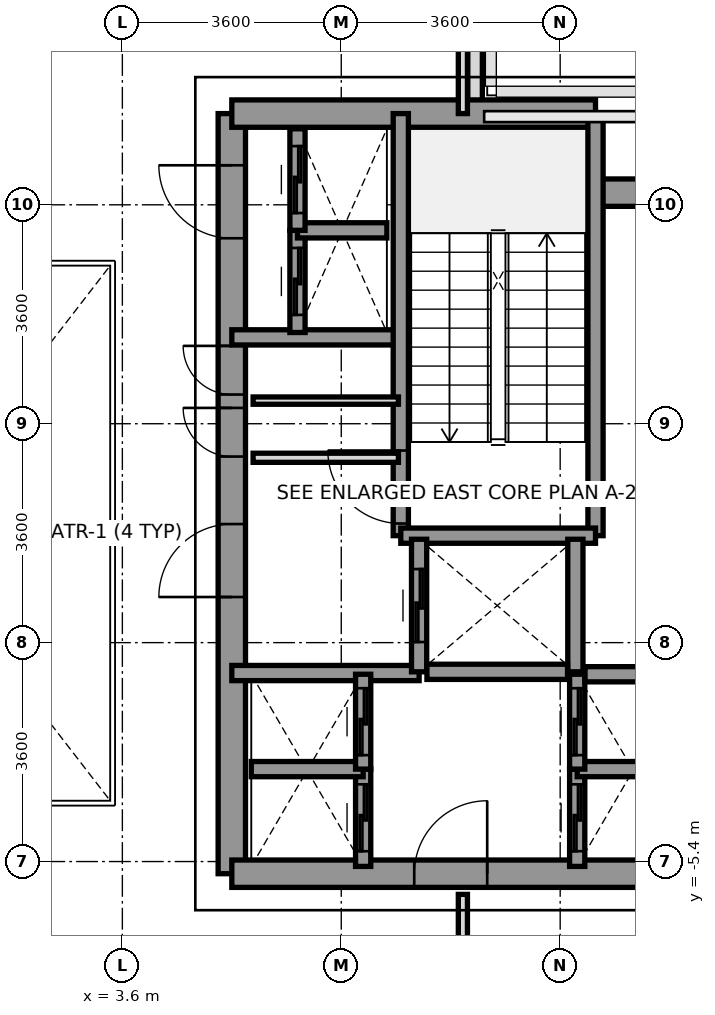
"""IFC4 building model, lengths in metres.
Left out: names, types, materials, properties, quantities, classifications, styles, units other than length and angle.
Written with IfcOpenShell. Run it as: python <this file> out.ifc"""

import sys

from ifc_helpers import new_model, si_unit, direction, frame, frame_2d, origin, place, context, subcontext, project, spatial, rectangle, extrude, source, transform, mapped, element, fill, save


model = new_model("IFC4")
c1 = context("Model", 3, precision=1e-05, world=origin(), true_north=direction((0.0, 1.0)))
c2 = subcontext(c1, "Body", "Model", "MODEL_VIEW")
j1 = project(units=[si_unit("LENGTHUNIT", "METRE"), si_unit("PLANEANGLEUNIT", "RADIAN")], contexts=[c1])
p1 = place(None, origin())
s1 = spatial("IfcSite", under=j1, at=p1, CompositionType="ELEMENT")
p2 = place(p1, origin())
s2 = spatial("IfcBuilding", under=s1, at=p2, CompositionType="ELEMENT")
p3 = place(p2, frame((0.0, 0.0, 93.0)))
s3 = spatial("IfcBuildingStorey", under=s2, at=p3, CompositionType="ELEMENT", Elevation=93.0)
p4 = place(p3, frame((9.4, 8.472, 0.0), z_axis=(0.0, 0.0, 1.0), x_axis=(0.0, -1.0, 0.0)))
e1 = element("IfcWall", 1, at=p4, inside=s3, PredefinedType="PARAPET", context=c2, shape_type="SweptSolid", body=[
    extrude(rectangle(XDim=1.519, YDim=0.24, at=frame_2d((0.76, 0.0))), origin(), (0.0, 0.0, 1.0), 1.15),
])
p5 = place(p3, frame((5.4, -5.6, 0.0), z_axis=(0.0, 0.0, 1.0), x_axis=(0.0, 1.0, 0.0)))
e2 = element("IfcWall", 2, at=p5, inside=s3, PredefinedType="SHEAR", context=c2, shape_type="SweptSolid", body=[
    extrude(rectangle(XDim=12.5, YDim=0.45, at=frame_2d((6.25, 0.0))), origin(), (0.0, 0.0, 1.0), 4.0),
])
p6 = place(p5, frame((4.55, 0.0, 0.0)))
e3 = element("IfcOpeningElement", 3, at=p6, cuts=e2, PredefinedType="OPENING", context=c2, shape_type="SweptSolid", body=[
    extrude(rectangle(XDim=1.2, YDim=2.2, at=frame_2d((0.6, 1.1))), frame((0.0, 0.235, 0.0), z_axis=(0.0, -1.0, 0.0), x_axis=(1.0, 0.0, 0.0)), (0.0, 0.0, 1.0), 0.47),
])
p7 = place(p5, frame((10.45, 0.0, 0.0)))
e4 = element("IfcOpeningElement", 4, at=p7, cuts=e2, PredefinedType="OPENING", context=c2, shape_type="SweptSolid", body=[
    extrude(rectangle(XDim=1.2, YDim=2.2, at=frame_2d((0.6, 1.1))), frame((0.0, 0.235, 0.0), z_axis=(0.0, -1.0, 0.0), x_axis=(1.0, 0.0, 0.0)), (0.0, 0.0, 1.0), 0.47),
])
p8 = place(p5, frame((6.86, 0.0, 0.0)))
e5 = element("IfcOpeningElement", 5, at=p8, cuts=e2, PredefinedType="OPENING", context=c2, shape_type="SweptSolid", body=[
    extrude(rectangle(XDim=0.8, YDim=2.1, at=frame_2d((0.4, 1.05))), frame((0.0, 0.235, 0.0), z_axis=(0.0, -1.0, 0.0), x_axis=(1.0, 0.0, 0.0)), (0.0, 0.0, 1.0), 0.47),
])
p9 = place(p5, frame((7.88, 0.0, 0.0)))
e6 = element("IfcOpeningElement", 6, at=p9, cuts=e2, PredefinedType="OPENING", context=c2, shape_type="SweptSolid", body=[
    extrude(rectangle(XDim=0.8, YDim=2.1, at=frame_2d((0.4, 1.05))), frame((0.0, 0.235, 0.0), z_axis=(0.0, -1.0, 0.0), x_axis=(1.0, 0.0, 0.0)), (0.0, 0.0, 1.0), 0.47),
])
p10 = place(p3, frame((5.4, 6.9, 0.0), z_axis=(0.0, 0.0, 1.0), x_axis=(1.0, 0.0, 0.0)))
e7 = element("IfcWall", 7, at=p10, inside=s3, PredefinedType="SHEAR", context=c2, shape_type="SweptSolid", body=[
    extrude(rectangle(XDim=5.981, YDim=0.45, at=frame_2d((2.991, 0.0))), origin(), (0.0, 0.0, 1.0), 4.0),
])
p11 = place(p3, frame((11.381, 5.6, 0.0), z_axis=(0.0, 0.0, 1.0), x_axis=(1.0, 0.0, 0.0)))
e8 = element("IfcWall", 8, at=p11, inside=s3, PredefinedType="SHEAR", context=c2, shape_type="SweptSolid", body=[
    extrude(rectangle(XDim=1.819, YDim=0.45, at=frame_2d((0.909, 0.0))), origin(), (0.0, 0.0, 1.0), 4.0),
])
p12 = place(p3, frame((5.4, -5.6, 0.0), z_axis=(0.0, 0.0, 1.0), x_axis=(1.0, 0.0, 0.0)))
e9 = element("IfcWall", 9, at=p12, inside=s3, PredefinedType="SHEAR", context=c2, shape_type="SweptSolid", body=[
    extrude(rectangle(XDim=7.8, YDim=0.45, at=frame_2d((3.9, 0.0))), origin(), (0.0, 0.0, 1.0), 4.0),
])
p13 = place(p12, frame((3.0, 0.0, 0.0)))
e10 = element("IfcOpeningElement", 10, at=p13, cuts=e9, PredefinedType="OPENING", context=c2, shape_type="SweptSolid", body=[
    extrude(rectangle(XDim=1.2, YDim=2.2, at=frame_2d((0.6, 1.1))), frame((0.0, 0.235, 0.0), z_axis=(0.0, -1.0, 0.0), x_axis=(1.0, 0.0, 0.0)), (0.0, 0.0, 1.0), 0.47),
])
p14 = place(p3, frame((5.4, 3.22, 0.0), z_axis=(0.0, 0.0, 1.0), x_axis=(1.0, 0.0, 0.0)))
e11 = element("IfcWall", 11, at=p14, inside=s3, PredefinedType="SOLIDWALL", context=c2, shape_type="SweptSolid", body=[
    extrude(rectangle(XDim=2.78, YDim=0.25, at=frame_2d((1.39, 0.0))), origin(), (0.0, 0.0, 1.0), 4.0),
])
p15 = place(p3, frame((5.4, -2.3, 0.0), z_axis=(0.0, 0.0, 1.0), x_axis=(1.0, 0.0, 0.0)))
e12 = element("IfcWall", 12, at=p15, inside=s3, PredefinedType="SOLIDWALL", context=c2, shape_type="SweptSolid", body=[
    extrude(rectangle(XDim=3.08, YDim=0.25, at=frame_2d((1.54, 0.0))), origin(), (0.0, 0.0, 1.0), 4.0),
])
p16 = place(p3, frame((8.179, -0.041, 0.0), z_axis=(0.0, 0.0, 1.0), x_axis=(0.0, 1.0, 0.0)))
e13 = element("IfcWall", 13, at=p16, inside=s3, PredefinedType="SOLIDWALL", context=c2, shape_type="SweptSolid", body=[
    extrude(rectangle(XDim=6.941, YDim=0.25, at=frame_2d((3.47, 0.0))), origin(), (0.0, 0.0, 1.0), 4.0),
])
p17 = place(p16, frame((0.2, 0.0, 0.0)))
e14 = element("IfcOpeningElement", 14, at=p17, cuts=e13, PredefinedType="OPENING", context=c2, shape_type="SweptSolid", body=[
    extrude(rectangle(XDim=1.2, YDim=2.2, at=frame_2d((0.6, 1.1))), frame((0.0, 0.135, 0.0), z_axis=(0.0, -1.0, 0.0), x_axis=(1.0, 0.0, 0.0)), (0.0, 0.0, 1.0), 0.27),
])
p18 = place(p3, frame((11.381, -0.041, 0.0), z_axis=(0.0, 0.0, 1.0), x_axis=(0.0, 1.0, 0.0)))
e15 = element("IfcWall", 15, at=p18, inside=s3, PredefinedType="SOLIDWALL", context=c2, shape_type="SweptSolid", body=[
    extrude(rectangle(XDim=6.941, YDim=0.25, at=frame_2d((3.47, 0.0))), origin(), (0.0, 0.0, 1.0), 4.0),
])
p19 = place(p3, frame((8.179, -0.041, 0.0), z_axis=(0.0, 0.0, 1.0), x_axis=(1.0, 0.0, 0.0)))
e16 = element("IfcWall", 16, at=p19, inside=s3, PredefinedType="SOLIDWALL", context=c2, shape_type="SweptSolid", body=[
    extrude(rectangle(XDim=3.202, YDim=0.25, at=frame_2d((1.601, 0.0))), origin(), (0.0, 0.0, 1.0), 4.0),
])
p20 = place(p3, frame((8.48, -2.28, 0.0), z_axis=(0.0, 0.0, 1.0), x_axis=(0.0, 1.0, 0.0)))
e17 = element("IfcWall", 17, at=p20, inside=s3, PredefinedType="SOLIDWALL", context=c2, shape_type="SweptSolid", body=[
    extrude(rectangle(XDim=2.18, YDim=0.25, at=frame_2d((1.09, 0.0))), origin(), (0.0, 0.0, 1.0), 4.0),
])
p21 = place(p20, frame((0.49, 0.0, 0.0)))
e18 = element("IfcOpeningElement", 18, at=p21, cuts=e17, PredefinedType="OPENING", context=c2, shape_type="SweptSolid", body=[
    extrude(rectangle(XDim=1.2, YDim=2.2, at=frame_2d((0.6, 1.1))), frame((0.0, 0.135, 0.0), z_axis=(0.0, -1.0, 0.0), x_axis=(1.0, 0.0, 0.0)), (0.0, 0.0, 1.0), 0.27),
])
p22 = place(p3, frame((11.05, -2.28, 0.0), z_axis=(0.0, 0.0, 1.0), x_axis=(0.0, 1.0, 0.0)))
e19 = element("IfcWall", 19, at=p22, inside=s3, PredefinedType="SOLIDWALL", context=c2, shape_type="SweptSolid", body=[
    extrude(rectangle(XDim=2.18, YDim=0.25, at=frame_2d((1.09, 0.0))), origin(), (0.0, 0.0, 1.0), 4.0),
])
p23 = place(p3, frame((8.609, -2.28, 0.0), z_axis=(0.0, 0.0, 1.0), x_axis=(1.0, 0.0, 0.0)))
e20 = element("IfcWall", 20, at=p23, inside=s3, PredefinedType="SOLIDWALL", context=c2, shape_type="SweptSolid", body=[
    extrude(rectangle(XDim=2.312, YDim=0.25, at=frame_2d((1.156, 0.0))), origin(), (0.0, 0.0, 1.0), 4.0),
])
p24 = place(p3, frame((11.08, -5.48, 0.0), z_axis=(0.0, 0.0, 1.0), x_axis=(0.0, 1.0, 0.0)))
e21 = element("IfcWall", 21, at=p24, inside=s3, PredefinedType="SOLIDWALL", context=c2, shape_type="SweptSolid", body=[
    extrude(rectangle(XDim=1.6, YDim=0.25, at=frame_2d((0.8, 0.0))), origin(), (0.0, 0.0, 1.0), 4.0),
])
p25 = place(p24, frame((0.25, 0.0, 0.0)))
e22 = element("IfcOpeningElement", 22, at=p25, cuts=e21, PredefinedType="OPENING", context=c2, shape_type="SweptSolid", body=[
    extrude(rectangle(XDim=1.1, YDim=2.2, at=frame_2d((0.55, 1.1))), frame((0.0, 0.135, 0.0), z_axis=(0.0, -1.0, 0.0), x_axis=(1.0, 0.0, 0.0)), (0.0, 0.0, 1.0), 0.27),
])
p26 = place(p3, frame((11.08, -3.88, 0.0), z_axis=(0.0, 0.0, 1.0), x_axis=(1.0, 0.0, 0.0)))
e23 = element("IfcWall", 23, at=p26, inside=s3, PredefinedType="SOLIDWALL", context=c2, shape_type="SweptSolid", body=[
    extrude(rectangle(XDim=1.84, YDim=0.25, at=frame_2d((0.92, 0.0))), origin(), (0.0, 0.0, 1.0), 4.0),
])
p27 = place(p3, frame((11.08, -3.88, 0.0), z_axis=(0.0, 0.0, 1.0), x_axis=(0.0, 1.0, 0.0)))
e24 = element("IfcWall", 24, at=p27, inside=s3, PredefinedType="SOLIDWALL", context=c2, shape_type="SweptSolid", body=[
    extrude(rectangle(XDim=1.56, YDim=0.25, at=frame_2d((0.78, 0.0))), origin(), (0.0, 0.0, 1.0), 4.0),
])
p28 = place(p27, frame((0.23, 0.0, 0.0)))
e25 = element("IfcOpeningElement", 25, at=p28, cuts=e24, PredefinedType="OPENING", context=c2, shape_type="SweptSolid", body=[
    extrude(rectangle(XDim=1.1, YDim=2.2, at=frame_2d((0.55, 1.1))), frame((0.0, 0.135, 0.0), z_axis=(0.0, -1.0, 0.0), x_axis=(1.0, 0.0, 0.0)), (0.0, 0.0, 1.0), 0.27),
])
p29 = place(p3, frame((11.209, -2.32, 0.0), z_axis=(0.0, 0.0, 1.0), x_axis=(1.0, 0.0, 0.0)))
e26 = element("IfcWall", 26, at=p29, inside=s3, PredefinedType="SOLIDWALL", context=c2, shape_type="SweptSolid", body=[
    extrude(rectangle(XDim=1.582, YDim=0.25, at=frame_2d((0.791, 0.0))), origin(), (0.0, 0.0, 1.0), 4.0),
])
p30 = place(p3, frame((7.56, -5.48, 0.0), z_axis=(0.0, 0.0, 1.0), x_axis=(0.0, 1.0, 0.0)))
e27 = element("IfcWall", 27, at=p30, inside=s3, PredefinedType="SOLIDWALL", context=c2, shape_type="SweptSolid", body=[
    extrude(rectangle(XDim=1.6, YDim=0.25, at=frame_2d((0.8, 0.0))), origin(), (0.0, 0.0, 1.0), 4.0),
])
p31 = place(p30, frame((0.25, 0.0, 0.0)))
e28 = element("IfcOpeningElement", 28, at=p31, cuts=e27, PredefinedType="OPENING", context=c2, shape_type="SweptSolid", body=[
    extrude(rectangle(XDim=1.1, YDim=2.2, at=frame_2d((0.55, 1.1))), frame((0.0, 0.135, 0.0), z_axis=(0.0, -1.0, 0.0), x_axis=(1.0, 0.0, 0.0)), (0.0, 0.0, 1.0), 0.27),
])
p32 = place(p3, frame((5.72, -3.88, 0.0), z_axis=(0.0, 0.0, 1.0), x_axis=(1.0, 0.0, 0.0)))
e29 = element("IfcWall", 29, at=p32, inside=s3, PredefinedType="SOLIDWALL", context=c2, shape_type="SweptSolid", body=[
    extrude(rectangle(XDim=1.84, YDim=0.25, at=frame_2d((0.92, 0.0))), origin(), (0.0, 0.0, 1.0), 4.0),
])
p33 = place(p3, frame((7.56, -3.88, 0.0), z_axis=(0.0, 0.0, 1.0), x_axis=(0.0, 1.0, 0.0)))
e30 = element("IfcWall", 30, at=p33, inside=s3, PredefinedType="SOLIDWALL", context=c2, shape_type="SweptSolid", body=[
    extrude(rectangle(XDim=1.56, YDim=0.25, at=frame_2d((0.78, 0.0))), origin(), (0.0, 0.0, 1.0), 4.0),
])
p34 = place(p33, frame((0.23, 0.0, 0.0)))
e31 = element("IfcOpeningElement", 31, at=p34, cuts=e30, PredefinedType="OPENING", context=c2, shape_type="SweptSolid", body=[
    extrude(rectangle(XDim=1.1, YDim=2.2, at=frame_2d((0.55, 1.1))), frame((0.0, 0.135, 0.0), z_axis=(0.0, -1.0, 0.0), x_axis=(1.0, 0.0, 0.0)), (0.0, 0.0, 1.0), 0.27),
])
p35 = place(p3, frame((6.48, 3.3, 0.0), z_axis=(0.0, 0.0, 1.0), x_axis=(0.0, 1.0, 0.0)))
e32 = element("IfcWall", 32, at=p35, inside=s3, PredefinedType="SOLIDWALL", context=c2, shape_type="SweptSolid", body=[
    extrude(rectangle(XDim=1.68, YDim=0.25, at=frame_2d((0.84, 0.0))), origin(), (0.0, 0.0, 1.0), 4.0),
])
p36 = place(p35, frame((0.29, 0.0, 0.0)))
e33 = element("IfcOpeningElement", 33, at=p36, cuts=e32, PredefinedType="OPENING", context=c2, shape_type="SweptSolid", body=[
    extrude(rectangle(XDim=1.1, YDim=2.2, at=frame_2d((0.55, 1.1))), frame((0.0, 0.135, 0.0), z_axis=(0.0, -1.0, 0.0), x_axis=(1.0, 0.0, 0.0)), (0.0, 0.0, 1.0), 0.27),
])
p37 = place(p3, frame((6.48, 4.98, 0.0), z_axis=(0.0, 0.0, 1.0), x_axis=(1.0, 0.0, 0.0)))
e34 = element("IfcWall", 34, at=p37, inside=s3, PredefinedType="SOLIDWALL", context=c2, shape_type="SweptSolid", body=[
    extrude(rectangle(XDim=1.47, YDim=0.25, at=frame_2d((0.735, 0.0))), origin(), (0.0, 0.0, 1.0), 4.0),
])
p38 = place(p3, frame((6.48, 4.98, 0.0), z_axis=(0.0, 0.0, 1.0), x_axis=(0.0, 1.0, 0.0)))
e35 = element("IfcWall", 35, at=p38, inside=s3, PredefinedType="SOLIDWALL", context=c2, shape_type="SweptSolid", body=[
    extrude(rectangle(XDim=1.67, YDim=0.25, at=frame_2d((0.835, 0.0))), origin(), (0.0, 0.0, 1.0), 4.0),
])
p39 = place(p38, frame((0.285, 0.0, 0.0)))
e36 = element("IfcOpeningElement", 36, at=p39, cuts=e35, PredefinedType="OPENING", context=c2, shape_type="SweptSolid", body=[
    extrude(rectangle(XDim=1.1, YDim=2.2, at=frame_2d((0.55, 1.1))), frame((0.0, 0.135, 0.0), z_axis=(0.0, -1.0, 0.0), x_axis=(1.0, 0.0, 0.0)), (0.0, 0.0, 1.0), 0.27),
])
p40 = place(p3, frame((5.75, 1.24, 0.0), z_axis=(0.0, 0.0, 1.0), x_axis=(1.0, 0.0, 0.0)))
e37 = element("IfcWall", 37, at=p40, inside=s3, PredefinedType="PARTITIONING", context=c2, shape_type="SweptSolid", body=[
    extrude(rectangle(XDim=2.39, YDim=0.15, at=frame_2d((1.195, 0.0))), origin(), (0.0, 0.0, 1.0), 3.1),
])
p41 = place(p3, frame((5.75, 2.18, 0.0), z_axis=(0.0, 0.0, 1.0), x_axis=(1.0, 0.0, 0.0)))
e38 = element("IfcWall", 38, at=p41, inside=s3, PredefinedType="PARTITIONING", context=c2, shape_type="SweptSolid", body=[
    extrude(rectangle(XDim=2.39, YDim=0.12, at=frame_2d((1.195, 0.0))), origin(), (0.0, 0.0, 1.0), 3.1),
])
p42 = place(p3, frame((9.2, 6.9, 0.0), z_axis=(0.0, 0.0, 1.0), x_axis=(0.0, 1.0, 0.0)))
e39 = element("IfcWall", 39, at=p42, inside=s3, PredefinedType="PARTITIONING", context=c2, shape_type="SweptSolid", body=[
    extrude(rectangle(XDim=8.78, YDim=0.15, at=frame_2d((4.39, 0.0))), origin(), (0.0, 0.0, 1.0), 3.5),
])
p43 = place(p3, frame((9.2, -15.68, 0.0), z_axis=(0.0, 0.0, 1.0), x_axis=(0.0, 1.0, 0.0)))
e40 = element("IfcWall", 40, at=p43, inside=s3, PredefinedType="PARTITIONING", context=c2, shape_type="SweptSolid", body=[
    extrude(rectangle(XDim=9.74, YDim=0.15, at=frame_2d((4.87, 0.0))), origin(), (0.0, 0.0, 1.0), 3.5),
])
m1 = source(origin(), c2, "Body", "SweptSolid", [
    extrude(rectangle(XDim=1.2, YDim=2.2, at=frame_2d((0.6, 1.1))), frame((0.0, 0.025, 0.0), z_axis=(0.0, -1.0, 0.0), x_axis=(1.0, 0.0, 0.0)), (0.0, 0.0, 1.0), 0.05),
])
p44 = place(p17, origin())
e41 = element("IfcDoor", 41, at=p44, inside=s3, OperationType="SINGLE_SWING_RIGHT", PredefinedType="DOOR", context=c2, shape_type="MappedRepresentation", body=[
    mapped(m1, transform((0.0, 0.0, 0.0), x_axis=(1.0, 0.0, 0.0), y_axis=(0.0, 1.0, 0.0), z_axis=(0.0, 0.0, 1.0), scale=1.0)),
])
fill(e14, e41)
p45 = place(p6, origin())
e42 = element("IfcDoor", 42, at=p45, inside=s3, OperationType="SINGLE_SWING_LEFT", PredefinedType="DOOR", context=c2, shape_type="MappedRepresentation", body=[
    mapped(m1, transform((0.0, 0.0, 0.0), x_axis=(1.0, 0.0, 0.0), y_axis=(0.0, 1.0, 0.0), z_axis=(0.0, 0.0, 1.0), scale=1.0)),
])
fill(e3, e42)
p46 = place(p7, origin())
e43 = element("IfcDoor", 43, at=p46, inside=s3, OperationType="SINGLE_SWING_RIGHT", PredefinedType="DOOR", context=c2, shape_type="MappedRepresentation", body=[
    mapped(m1, transform((0.0, 0.0, 0.0), x_axis=(1.0, 0.0, 0.0), y_axis=(0.0, 1.0, 0.0), z_axis=(0.0, 0.0, 1.0), scale=1.0)),
])
fill(e4, e43)
p47 = place(p13, origin())
e44 = element("IfcDoor", 44, at=p47, inside=s3, OperationType="SINGLE_SWING_RIGHT", PredefinedType="DOOR", context=c2, shape_type="MappedRepresentation", body=[
    mapped(m1, transform((0.0, 0.0, 0.0), x_axis=(1.0, 0.0, 0.0), y_axis=(0.0, 1.0, 0.0), z_axis=(0.0, 0.0, 1.0), scale=1.0)),
])
fill(e10, e44)
m2 = source(origin(), c2, "Body", "SweptSolid", [
    extrude(rectangle(XDim=0.8, YDim=2.1, at=frame_2d((0.4, 1.05))), frame((0.0, 0.025, 0.0), z_axis=(0.0, -1.0, 0.0), x_axis=(1.0, 0.0, 0.0)), (0.0, 0.0, 1.0), 0.05),
])
p48 = place(p8, origin())
e45 = element("IfcDoor", 45, at=p48, inside=s3, OperationType="SINGLE_SWING_RIGHT", PredefinedType="DOOR", context=c2, shape_type="MappedRepresentation", body=[
    mapped(m2, transform((0.0, 0.0, 0.0), x_axis=(1.0, 0.0, 0.0), y_axis=(0.0, 1.0, 0.0), z_axis=(0.0, 0.0, 1.0), scale=1.0)),
])
fill(e5, e45)
p49 = place(p9, origin())
e46 = element("IfcDoor", 46, at=p49, inside=s3, OperationType="SINGLE_SWING_RIGHT", PredefinedType="DOOR", context=c2, shape_type="MappedRepresentation", body=[
    mapped(m2, transform((0.0, 0.0, 0.0), x_axis=(1.0, 0.0, 0.0), y_axis=(0.0, 1.0, 0.0), z_axis=(0.0, 0.0, 1.0), scale=1.0)),
])
fill(e6, e46)
p50 = place(p21, origin())
e47 = element("IfcDoor", 47, at=p50, inside=s3, OperationType="SLIDING_TO_RIGHT", PredefinedType="DOOR", context=c2, shape_type="MappedRepresentation", body=[
    mapped(m1, transform((0.0, 0.0, 0.0), x_axis=(1.0, 0.0, 0.0), y_axis=(0.0, 1.0, 0.0), z_axis=(0.0, 0.0, 1.0), scale=1.0)),
])
fill(e18, e47)
m3 = source(origin(), c2, "Body", "SweptSolid", [
    extrude(rectangle(XDim=1.1, YDim=2.2, at=frame_2d((0.55, 1.1))), frame((0.0, 0.025, 0.0), z_axis=(0.0, -1.0, 0.0), x_axis=(1.0, 0.0, 0.0)), (0.0, 0.0, 1.0), 0.05),
])
p51 = place(p25, origin())
e48 = element("IfcDoor", 48, at=p51, inside=s3, OperationType="SLIDING_TO_LEFT", PredefinedType="DOOR", context=c2, shape_type="MappedRepresentation", body=[
    mapped(m3, transform((0.0, 0.0, 0.0), x_axis=(1.0, 0.0, 0.0), y_axis=(0.0, 1.0, 0.0), z_axis=(0.0, 0.0, 1.0), scale=1.0)),
])
fill(e22, e48)
p52 = place(p28, origin())
e49 = element("IfcDoor", 49, at=p52, inside=s3, OperationType="SLIDING_TO_LEFT", PredefinedType="DOOR", context=c2, shape_type="MappedRepresentation", body=[
    mapped(m3, transform((0.0, 0.0, 0.0), x_axis=(1.0, 0.0, 0.0), y_axis=(0.0, 1.0, 0.0), z_axis=(0.0, 0.0, 1.0), scale=1.0)),
])
fill(e25, e49)
p53 = place(p31, origin())
e50 = element("IfcDoor", 50, at=p53, inside=s3, OperationType="SLIDING_TO_LEFT", PredefinedType="DOOR", context=c2, shape_type="MappedRepresentation", body=[
    mapped(m3, transform((0.0, 0.0, 0.0), x_axis=(1.0, 0.0, 0.0), y_axis=(0.0, 1.0, 0.0), z_axis=(0.0, 0.0, 1.0), scale=1.0)),
])
fill(e28, e50)
p54 = place(p34, origin())
e51 = element("IfcDoor", 51, at=p54, inside=s3, OperationType="SLIDING_TO_LEFT", PredefinedType="DOOR", context=c2, shape_type="MappedRepresentation", body=[
    mapped(m3, transform((0.0, 0.0, 0.0), x_axis=(1.0, 0.0, 0.0), y_axis=(0.0, 1.0, 0.0), z_axis=(0.0, 0.0, 1.0), scale=1.0)),
])
fill(e31, e51)
p55 = place(p36, origin())
e52 = element("IfcDoor", 52, at=p55, inside=s3, OperationType="SLIDING_TO_LEFT", PredefinedType="DOOR", context=c2, shape_type="MappedRepresentation", body=[
    mapped(m3, transform((0.0, 0.0, 0.0), x_axis=(1.0, 0.0, 0.0), y_axis=(0.0, 1.0, 0.0), z_axis=(0.0, 0.0, 1.0), scale=1.0)),
])
fill(e33, e52)
p56 = place(p39, origin())
e53 = element("IfcDoor", 53, at=p56, inside=s3, OperationType="SLIDING_TO_LEFT", PredefinedType="DOOR", context=c2, shape_type="MappedRepresentation", body=[
    mapped(m3, transform((0.0, 0.0, 0.0), x_axis=(1.0, 0.0, 0.0), y_axis=(0.0, 1.0, 0.0), z_axis=(0.0, 0.0, 1.0), scale=1.0)),
])
fill(e36, e53)
save(model, sys.argv[1])
